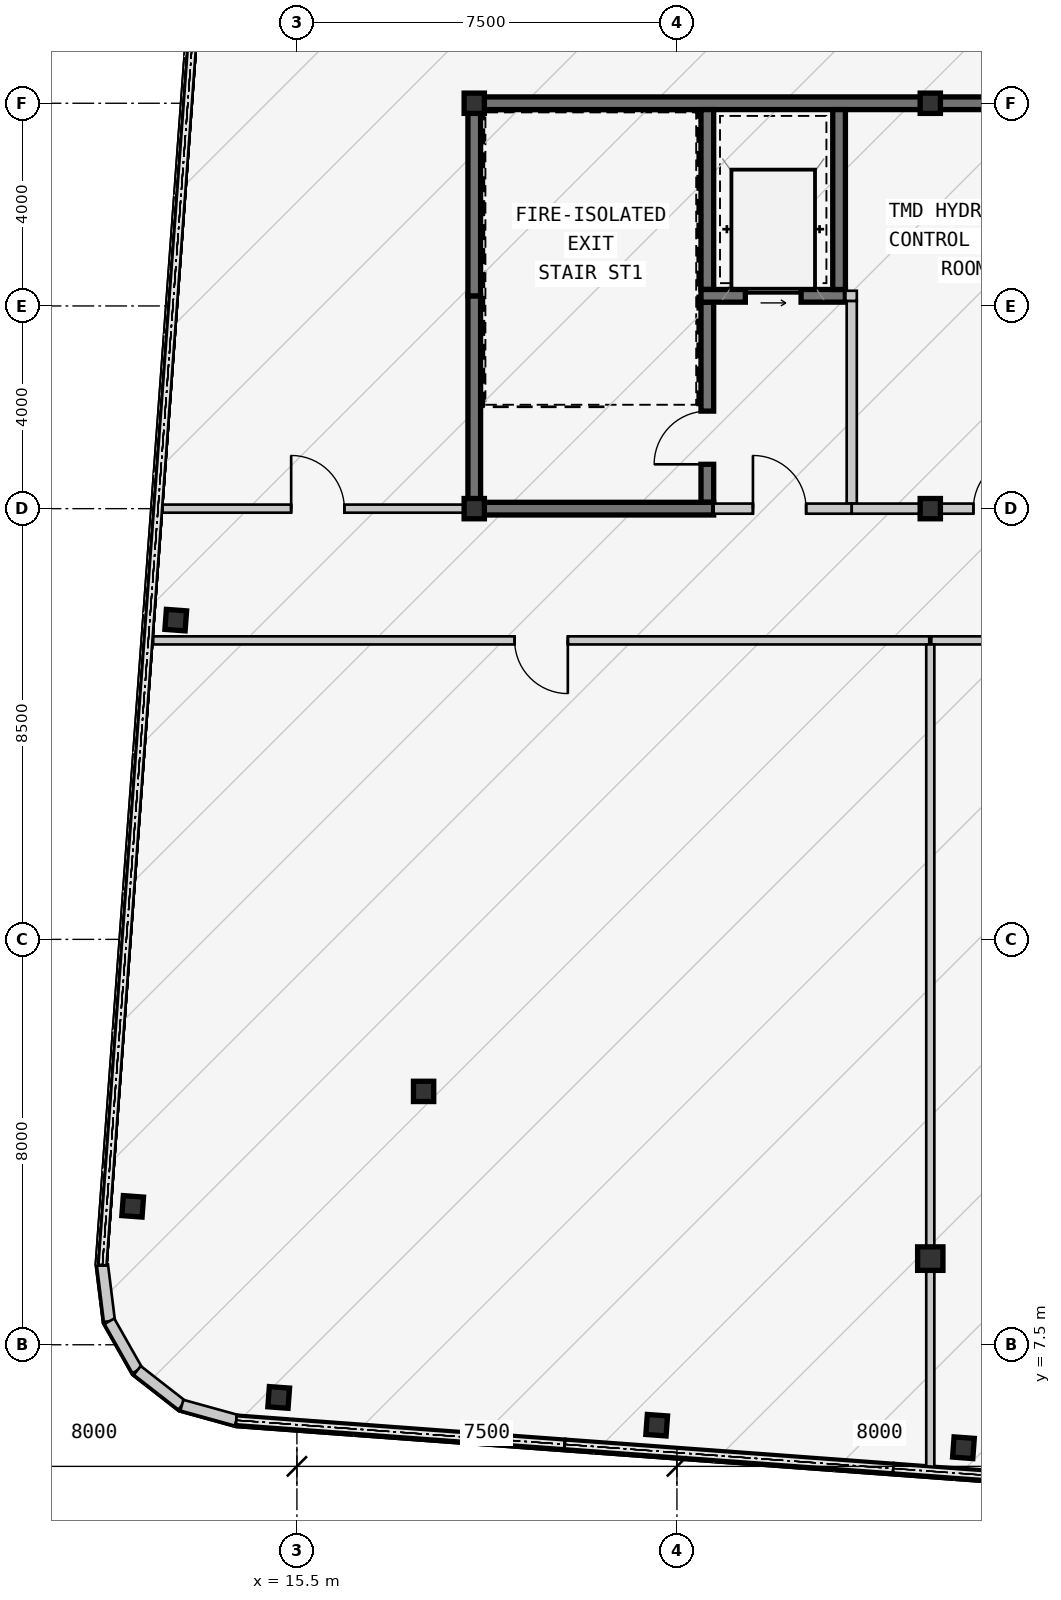
"""IFC4 building model, lengths in metres.
Left out: names, types, materials, properties, quantities, classifications, styles, units other than length and angle.
Written with IfcOpenShell. Run it as: python <this file> out.ifc"""

import sys

from ifc_helpers import new_model, si_unit, direction, frame, frame_2d, origin, origin_2d, place, context, subcontext, project, spatial, polyline, rectangle, hollow_rectangle, i_section, outline, extrude, source, transform, mapped, element, fill, save


model = new_model("IFC4")
c1 = context("Model", 3, precision=1e-05, world=origin(), true_north=direction((0.0, 1.0)))
c2 = subcontext(c1, "Body", "Model", "MODEL_VIEW")
j1 = project(units=[si_unit("LENGTHUNIT", "METRE"), si_unit("PLANEANGLEUNIT", "RADIAN")], contexts=[c1])
p1 = place(None, origin())
s1 = spatial("IfcSite", under=j1, at=p1, CompositionType="ELEMENT")
p2 = place(p1, origin())
s2 = spatial("IfcBuilding", under=s1, at=p2, CompositionType="ELEMENT")
p3 = place(p2, frame((0.0, 0.0, 253.05)))
s3 = spatial("IfcBuildingStorey", under=s2, at=p3, CompositionType="ELEMENT", Elevation=253.05)
m1 = source(origin(), c2, "Body", "SweptSolid", [
    extrude(hollow_rectangle(XDim=0.4, YDim=0.4, WallThickness=0.016, at=origin_2d()), origin(), (0.0, 0.0, 1.0), 15.375),
])
p4 = place(p3, frame((19.0, 24.0, 0.0), z_axis=(0.0, 0.0, 1.0), x_axis=(1.0, 0.0, 0.0)))
e1 = element("IfcColumn", 1, at=p4, inside=s3, PredefinedType="COLUMN", context=c2, shape_type="MappedRepresentation", body=[
    mapped(m1, transform((0.0, 0.0, 0.0), scale=1.0)),
])
m2 = source(origin(), c2, "Body", "SweptSolid", [
    extrude(hollow_rectangle(XDim=0.4, YDim=0.4, WallThickness=0.016, at=origin_2d()), origin(), (0.0, 0.0, 1.0), 12.802),
])
p5 = place(p3, frame((28.0, 24.0, 0.0), z_axis=(0.0, 0.0, 1.0), x_axis=(1.0, 0.0, 0.0)))
e2 = element("IfcColumn", 2, at=p5, inside=s3, PredefinedType="COLUMN", context=c2, shape_type="MappedRepresentation", body=[
    mapped(m2, transform((0.0, 0.0, 0.0), scale=1.0)),
])
m3 = source(origin(), c2, "Body", "SweptSolid", [
    extrude(hollow_rectangle(XDim=0.4, YDim=0.4, WallThickness=0.016, at=origin_2d()), origin(), (0.0, 0.0, 1.0), 15.543),
])
p6 = place(p3, frame((19.0, 32.0, 0.0), z_axis=(0.0, 0.0, 1.0), x_axis=(1.0, 0.0, 0.0)))
e3 = element("IfcColumn", 3, at=p6, inside=s3, PredefinedType="COLUMN", context=c2, shape_type="MappedRepresentation", body=[
    mapped(m3, transform((0.0, 0.0, 0.0), scale=1.0)),
])
m4 = source(origin(), c2, "Body", "SweptSolid", [
    extrude(hollow_rectangle(XDim=0.4, YDim=0.4, WallThickness=0.016, at=origin_2d()), origin(), (0.0, 0.0, 1.0), 12.97),
])
p7 = place(p3, frame((28.0, 32.0, 0.0), z_axis=(0.0, 0.0, 1.0), x_axis=(1.0, 0.0, 0.0)))
e4 = element("IfcColumn", 4, at=p7, inside=s3, PredefinedType="COLUMN", context=c2, shape_type="MappedRepresentation", body=[
    mapped(m4, transform((0.0, 0.0, 0.0), scale=1.0)),
])
m5 = source(origin(), c2, "Body", "SweptSolid", [
    extrude(i_section(OverallWidth=0.5, OverallDepth=0.464, WebThickness=0.022, FlangeThickness=0.034, at=origin_2d()), origin(), (0.0, 0.0, 1.0), 12.492),
])
p8 = place(p3, frame((28.0, 9.2, 0.0), z_axis=(0.0, 0.0, 1.0), x_axis=(1.0, 0.0, 0.0)))
e5 = element("IfcColumn", 5, at=p8, inside=s3, PredefinedType="COLUMN", context=c2, shape_type="MappedRepresentation", body=[
    mapped(m5, transform((0.0, 0.0, 0.0), scale=1.0)),
])
m6 = source(origin(), c2, "Body", "SweptSolid", [
    extrude(hollow_rectangle(XDim=0.4, YDim=0.4, WallThickness=0.016, at=origin_2d()), origin(), (0.0, 0.0, 1.0), 15.42),
])
p9 = place(p3, frame((18.0, 12.5, 0.0), z_axis=(0.0, 0.0, 1.0), x_axis=(1.0, 0.0, 0.0)))
e6 = element("IfcColumn", 6, at=p9, inside=s3, PredefinedType="COLUMN", context=c2, shape_type="MappedRepresentation", body=[
    mapped(m6, transform((0.0, 0.0, 0.0), scale=1.0)),
])
m7 = source(origin(), c2, "Body", "SweptSolid", [
    extrude(hollow_rectangle(XDim=0.4, YDim=0.4, WallThickness=0.016, at=origin_2d()), origin(), (0.0, 0.0, 1.0), 16.111),
])
p10 = place(p3, frame((15.141, 6.46, 0.0), z_axis=(0.0, 0.0, 1.0), x_axis=(0.997314477224, -0.073238197128, 0.0)))
e7 = element("IfcColumn", 7, at=p10, inside=s3, PredefinedType="COLUMN", context=c2, shape_type="MappedRepresentation", body=[
    mapped(m7, transform((0.0, 0.0, 0.0), scale=1.0)),
])
m8 = source(origin(), c2, "Body", "SweptSolid", [
    extrude(i_section(OverallWidth=0.4, OverallDepth=0.396, WebThickness=0.022, FlangeThickness=0.034, at=origin_2d()), origin(), (0.0, 0.0, 1.0), 13.966),
])
p11 = place(p3, frame((22.601, 5.912, 0.0), z_axis=(0.0, 0.0, 1.0), x_axis=(0.997314477224, -0.073238197128, 0.0)))
e8 = element("IfcColumn", 8, at=p11, inside=s3, PredefinedType="COLUMN", context=c2, shape_type="MappedRepresentation", body=[
    mapped(m8, transform((0.0, 0.0, 0.0), scale=1.0)),
])
m9 = source(origin(), c2, "Body", "SweptSolid", [
    extrude(i_section(OverallWidth=0.4, OverallDepth=0.396, WebThickness=0.022, FlangeThickness=0.034, at=origin_2d()), origin(), (0.0, 0.0, 1.0), 17.014),
])
for number, where, z_axis, x_axis in (
    (9, (12.259, 10.231, 0.0), (0.0, 0.0, 1.0), (0.997, -0.073, 0.0)),
    (10, (13.109, 21.8, 0.0), (0.0, 0.0, 1.0), (0.997, -0.073, 0.0)),
):
    element("IfcColumn", number, at=place(p3, frame(where, z_axis=z_axis, x_axis=x_axis)), inside=s3, PredefinedType="COLUMN", context=c2, shape_type="MappedRepresentation", body=[
        mapped(m9, transform((0.0, 0.0, 0.0), scale=1.0)),
    ])
m10 = source(origin(), c2, "Body", "SweptSolid", [
    extrude(hollow_rectangle(XDim=0.4, YDim=0.4, WallThickness=0.016, at=origin_2d()), origin(), (0.0, 0.0, 1.0), 12.226),
])
p12 = place(p3, frame((28.654, 5.468, 0.0), z_axis=(0.0, 0.0, 1.0), x_axis=(0.997314477224, -0.073238197128, 0.0)))
e11 = element("IfcColumn", 11, at=p12, inside=s3, PredefinedType="COLUMN", context=c2, shape_type="MappedRepresentation", body=[
    mapped(m10, transform((0.0, 0.0, 0.0), scale=1.0)),
])
p13 = place(p3, frame((11.663, 9.072, 0.0), z_axis=(0.0, 0.0, 1.0), x_axis=(0.122742076028, -0.992438604032, 0.0)))
e12 = element("IfcWall", 12, at=p13, inside=s3, PredefinedType="SOLIDWALL", context=c2, shape_type="SweptSolid", body=[
    extrude(outline(polyline([(0.0, 0.0), (1.116, 0.0), (1.116, 17.055), (0.0, 17.118), (0.0, 0.0)])), frame((0.0, 0.11, 0.0), z_axis=(0.0, -1.0, 0.0), x_axis=(1.0, 0.0, 0.0)), (0.0, 0.0, 1.0), 0.22),
])
p14 = place(p3, frame((11.8, 7.965, 0.0), z_axis=(0.0, 0.0, 1.0), x_axis=(0.493073284892, -0.869987779067, 0.0)))
e13 = element("IfcWall", 13, at=p14, inside=s3, PredefinedType="SOLIDWALL", context=c2, shape_type="SweptSolid", body=[
    extrude(outline(polyline([(0.0, 0.0), (1.116, 0.0), (1.116, 16.878), (0.0, 17.055), (0.0, 0.0)])), frame((0.0, 0.11, 0.0), z_axis=(0.0, -1.0, 0.0), x_axis=(1.0, 0.0, 0.0)), (0.0, 0.0, 1.0), 0.22),
])
p15 = place(p3, frame((12.35, 6.994, 0.0), z_axis=(0.0, 0.0, 1.0), x_axis=(0.788597772321, -0.614909386406, 0.0)))
e14 = element("IfcWall", 14, at=p15, inside=s3, PredefinedType="SOLIDWALL", context=c2, shape_type="SweptSolid", body=[
    extrude(outline(polyline([(0.0, 0.0), (1.116, 0.0), (1.116, 16.612), (0.0, 16.878), (0.0, 0.0)])), frame((0.0, 0.11, 0.0), z_axis=(0.0, -1.0, 0.0), x_axis=(1.0, 0.0, 0.0)), (0.0, 0.0, 1.0), 0.22),
])
p16 = place(p3, frame((13.23, 6.307, 0.0), z_axis=(0.0, 0.0, 1.0), x_axis=(0.963890028874, -0.266300605026, 0.0)))
e15 = element("IfcWall", 15, at=p16, inside=s3, PredefinedType="SOLIDWALL", context=c2, shape_type="SweptSolid", body=[
    extrude(outline(polyline([(0.0, 0.0), (1.116, 0.0), (1.116, 16.298), (0.0, 16.612), (0.0, 0.0)])), frame((0.0, 0.11, 0.0), z_axis=(0.0, -1.0, 0.0), x_axis=(1.0, 0.0, 0.0)), (0.0, 0.0, 1.0), 0.22),
])
p17 = place(p3, frame((14.305, 6.01, 14.241), z_axis=(0.0, 0.0, 1.0), x_axis=(0.997314286366, -0.073240796084, 0.0)))
e16 = element("IfcWall", 16, at=p17, inside=s3, PredefinedType="SOLIDWALL", context=c2, shape_type="SweptSolid", body=[
    extrude(outline(polyline([(0.0, 0.0), (6.5, 0.0), (6.5, 0.22), (0.0, 2.083), (0.0, 0.0)])), frame((0.0, 0.11, 0.0), z_axis=(0.0, -1.0, 0.0), x_axis=(1.0, 0.0, 0.0)), (0.0, 0.0, 1.0), 0.22),
])
p18 = place(p3, frame((20.788, 5.534, 12.378), z_axis=(0.0, 0.0, 1.0), x_axis=(0.997314084878, -0.073243539677, 0.0)))
e17 = element("IfcWall", 17, at=p18, inside=s3, PredefinedType="SOLIDWALL", context=c2, shape_type="SweptSolid", body=[
    extrude(outline(polyline([(0.0, 0.0), (6.5, 0.0), (6.5, 0.22), (0.0, 2.083), (0.0, 0.0)])), frame((0.0, 0.11, 0.0), z_axis=(0.0, -1.0, 0.0), x_axis=(1.0, 0.0, 0.0)), (0.0, 0.0, 1.0), 0.22),
])
p19 = place(p3, frame((27.271, 5.058, 10.515), z_axis=(0.0, 0.0, 1.0), x_axis=(0.997314286366, -0.073240796084, 0.0)))
e18 = element("IfcWall", 18, at=p19, inside=s3, PredefinedType="SOLIDWALL", context=c2, shape_type="SweptSolid", body=[
    extrude(outline(polyline([(0.0, 0.0), (6.5, 0.0), (6.5, 0.22), (0.0, 2.083), (0.0, 0.0)])), frame((0.0, 0.11, 0.0), z_axis=(0.0, -1.0, 0.0), x_axis=(1.0, 0.0, 0.0)), (0.0, 0.0, 1.0), 0.22),
])
m11 = source(origin(), c2, "Body", "SweptSolid", [
    extrude(rectangle(XDim=9.125, YDim=0.25, at=frame_2d((4.562, 0.0))), origin(), (0.0, 0.0, 1.0), 4.3),
])
p20 = place(p3, frame((18.875, 32.0, 0.0), z_axis=(0.0, 0.0, 1.0), x_axis=(1.0, 0.0, 0.0)))
e19 = element("IfcWall", 19, at=p20, inside=s3, PredefinedType="SHEAR", context=c2, shape_type="MappedRepresentation", body=[
    mapped(m11, transform((0.0, 0.0, 0.0), scale=1.0)),
])
m12 = source(origin(), c2, "Body", "SweptSolid", [
    extrude(rectangle(XDim=11.2, YDim=0.25, at=frame_2d((5.6, 0.0))), origin(), (0.0, 0.0, 1.0), 4.3),
])
p21 = place(p3, frame((28.0, 32.0, 0.0), z_axis=(0.0, 0.0, 1.0), x_axis=(1.0, 0.0, 0.0)))
e20 = element("IfcWall", 20, at=p21, inside=s3, PredefinedType="SHEAR", context=c2, shape_type="MappedRepresentation", body=[
    mapped(m12, transform((0.0, 0.0, 0.0), scale=1.0)),
])
m13 = source(origin(), c2, "Body", "SweptSolid", [
    extrude(rectangle(XDim=4.075, YDim=0.25, at=frame_2d((2.038, 0.0))), origin(), (0.0, 0.0, 1.0), 4.3),
])
p22 = place(p3, frame((19.0, 24.125, 0.0), z_axis=(0.0, 0.0, 1.0), x_axis=(0.0, 1.0, 0.0)))
e21 = element("IfcWall", 21, at=p22, inside=s3, PredefinedType="SHEAR", context=c2, shape_type="MappedRepresentation", body=[
    mapped(m13, transform((0.0, 0.0, 0.0), scale=1.0)),
])
m14 = source(origin(), c2, "Body", "SweptSolid", [
    extrude(rectangle(XDim=3.675, YDim=0.25, at=frame_2d((1.837, 0.0))), origin(), (0.0, 0.0, 1.0), 4.3),
])
p23 = place(p3, frame((19.0, 28.2, 0.0), z_axis=(0.0, 0.0, 1.0), x_axis=(0.0, 1.0, 0.0)))
e22 = element("IfcWall", 22, at=p23, inside=s3, PredefinedType="SHEAR", context=c2, shape_type="MappedRepresentation", body=[
    mapped(m14, transform((0.0, 0.0, 0.0), scale=1.0)),
])
m15 = source(origin(), c2, "Body", "SweptSolid", [
    extrude(rectangle(XDim=3.55, YDim=0.25, at=frame_2d((1.775, 0.0))), origin(), (0.0, 0.0, 1.0), 4.3),
])
p24 = place(p3, frame((23.6, 28.325, 0.0), z_axis=(0.0, 0.0, 1.0), x_axis=(0.0, 1.0, 0.0)))
e23 = element("IfcWall", 23, at=p24, inside=s3, PredefinedType="SHEAR", context=c2, shape_type="MappedRepresentation", body=[
    mapped(m15, transform((0.0, 0.0, 0.0), scale=1.0)),
])
m16 = source(origin(), c2, "Body", "SweptSolid", [
    extrude(rectangle(XDim=3.95, YDim=0.25, at=frame_2d((1.975, 0.0))), origin(), (0.0, 0.0, 1.0), 4.3),
])
p25 = place(p3, frame((23.6, 24.125, 0.0), z_axis=(0.0, 0.0, 1.0), x_axis=(0.0, 1.0, 0.0)))
e24 = element("IfcWall", 24, at=p25, inside=s3, PredefinedType="SHEAR", context=c2, shape_type="MappedRepresentation", body=[
    mapped(m16, transform((0.0, 0.0, 0.0), scale=1.0)),
])
m17 = source(origin(), c2, "Body", "SweptSolid", [
    extrude(rectangle(XDim=1.05, YDim=2.1, at=frame_2d((0.525, 1.05))), frame((0.0, 0.135, 0.0), z_axis=(0.0, -1.0, 0.0), x_axis=(1.0, 0.0, 0.0)), (0.0, 0.0, 1.0), 0.27),
])
p26 = place(p25, frame((0.75, 0.0, 0.0)))
e25 = element("IfcOpeningElement", 25, at=p26, cuts=e24, PredefinedType="OPENING", context=c2, shape_type="MappedRepresentation", body=[
    mapped(m17, transform((0.0, 0.0, 0.0), scale=1.0)),
])
m18 = source(origin(), c2, "Body", "SweptSolid", [
    extrude(rectangle(XDim=4.85, YDim=0.25, at=frame_2d((2.425, 0.0))), origin(), (0.0, 0.0, 1.0), 4.3),
])
p27 = place(p3, frame((18.875, 24.0, 0.0), z_axis=(0.0, 0.0, 1.0), x_axis=(1.0, 0.0, 0.0)))
e26 = element("IfcWall", 26, at=p27, inside=s3, PredefinedType="SHEAR", context=c2, shape_type="MappedRepresentation", body=[
    mapped(m18, transform((0.0, 0.0, 0.0), scale=1.0)),
])
m19 = source(origin(), c2, "Body", "SweptSolid", [
    extrude(rectangle(XDim=2.85, YDim=0.25, at=frame_2d((1.425, 0.0))), origin(), (0.0, 0.0, 1.0), 4.3),
])
p28 = place(p3, frame((23.475, 28.2, 0.0), z_axis=(0.0, 0.0, 1.0), x_axis=(1.0, 0.0, 0.0)))
e27 = element("IfcWall", 27, at=p28, inside=s3, PredefinedType="SHEAR", context=c2, shape_type="MappedRepresentation", body=[
    mapped(m19, transform((0.0, 0.0, 0.0), scale=1.0)),
])
m20 = source(origin(), c2, "Body", "SweptSolid", [
    extrude(rectangle(XDim=1.1, YDim=2.15, at=frame_2d((0.55, 1.075))), frame((0.0, 0.135, 0.0), z_axis=(0.0, -1.0, 0.0), x_axis=(1.0, 0.0, 0.0)), (0.0, 0.0, 1.0), 0.27),
])
p29 = place(p28, frame((0.875, 0.0, 0.0)))
e28 = element("IfcOpeningElement", 28, at=p29, cuts=e27, PredefinedType="OPENING", context=c2, shape_type="MappedRepresentation", body=[
    mapped(m20, transform((0.0, 0.0, 0.0), scale=1.0)),
])
p30 = place(p3, frame((26.2, 28.325, 0.0), z_axis=(0.0, 0.0, 1.0), x_axis=(0.0, 1.0, 0.0)))
e29 = element("IfcWall", 29, at=p30, inside=s3, PredefinedType="SHEAR", context=c2, shape_type="MappedRepresentation", body=[
    mapped(m15, transform((0.0, 0.0, 0.0), scale=1.0)),
])
m21 = source(origin(), c2, "Body", "SweptSolid", [
    extrude(rectangle(XDim=4.0, YDim=0.2, at=frame_2d((2.0, 0.0))), origin(), (0.0, 0.0, 1.0), 4.3),
])
p31 = place(p3, frame((26.45, 24.1, 0.0), z_axis=(0.0, 0.0, 1.0), x_axis=(0.0, 1.0, 0.0)))
e30 = element("IfcWall", 30, at=p31, inside=s3, PredefinedType="SOLIDWALL", context=c2, shape_type="MappedRepresentation", body=[
    mapped(m21, transform((0.0, 0.0, 0.0), scale=1.0)),
])
m22 = source(origin(), c2, "Body", "SweptSolid", [
    extrude(rectangle(XDim=2.725, YDim=0.2, at=frame_2d((1.362, 0.0))), origin(), (0.0, 0.0, 1.0), 4.3),
])
p32 = place(p3, frame((23.725, 24.0, 0.0), z_axis=(0.0, 0.0, 1.0), x_axis=(1.0, 0.0, 0.0)))
e31 = element("IfcWall", 31, at=p32, inside=s3, PredefinedType="SOLIDWALL", context=c2, shape_type="MappedRepresentation", body=[
    mapped(m22, transform((0.0, 0.0, 0.0), scale=1.0)),
])
m23 = source(origin(), c2, "Body", "SweptSolid", [
    extrude(rectangle(XDim=1.05, YDim=2.1, at=frame_2d((0.525, 1.05))), frame((0.0, 0.11, 0.0), z_axis=(0.0, -1.0, 0.0), x_axis=(1.0, 0.0, 0.0)), (0.0, 0.0, 1.0), 0.22),
])
p33 = place(p32, frame((0.775, 0.0, 0.0)))
e32 = element("IfcOpeningElement", 32, at=p33, cuts=e31, PredefinedType="OPENING", context=c2, shape_type="MappedRepresentation", body=[
    mapped(m23, transform((0.0, 0.0, 0.0), scale=1.0)),
])
m24 = source(origin(), c2, "Body", "SweptSolid", [
    extrude(rectangle(XDim=4.75, YDim=0.2, at=frame_2d((2.375, 0.0))), origin(), (0.0, 0.0, 1.0), 4.3),
])
p34 = place(p3, frame((31.2, 24.0, 0.0), z_axis=(0.0, 0.0, 1.0), x_axis=(-1.0, 0.0, 0.0)))
e33 = element("IfcWall", 33, at=p34, inside=s3, PredefinedType="SOLIDWALL", context=c2, shape_type="MappedRepresentation", body=[
    mapped(m24, transform((0.0, 0.0, 0.0), scale=1.0)),
])
p35 = place(p34, frame((1.3, 0.0, 0.0)))
e34 = element("IfcOpeningElement", 34, at=p35, cuts=e33, PredefinedType="OPENING", context=c2, shape_type="MappedRepresentation", body=[
    mapped(m23, transform((0.0, 0.0, 0.0), scale=1.0)),
])
m25 = source(origin(), c2, "Body", "SweptSolid", [
    extrude(rectangle(XDim=13.959, YDim=0.16, at=frame_2d((6.98, 0.0))), origin(), (0.0, 0.0, 1.0), 4.3),
])
p36 = place(p3, frame((41.98, 21.4, 0.0), z_axis=(0.0, 0.0, 1.0), x_axis=(-1.0, 0.0, 0.0)))
e35 = element("IfcWall", 35, at=p36, inside=s3, PredefinedType="PARTITIONING", context=c2, shape_type="MappedRepresentation", body=[
    mapped(m25, transform((0.0, 0.0, 0.0), scale=1.0)),
])
m26 = source(origin(), c2, "Body", "SweptSolid", [
    extrude(rectangle(XDim=1.05, YDim=2.1, at=frame_2d((0.525, 1.05))), frame((0.0, 0.09, 0.0), z_axis=(0.0, -1.0, 0.0), x_axis=(1.0, 0.0, 0.0)), (0.0, 0.0, 1.0), 0.18),
])
p37 = place(p36, frame((6.455, 0.0, 0.0)))
e36 = element("IfcOpeningElement", 36, at=p37, cuts=e35, PredefinedType="OPENING", context=c2, shape_type="MappedRepresentation", body=[
    mapped(m26, transform((0.0, 0.0, 0.0), scale=1.0)),
])
m27 = source(origin(), c2, "Body", "SweptSolid", [
    extrude(rectangle(XDim=15.316, YDim=0.16, at=frame_2d((7.658, 0.0))), origin(), (0.0, 0.0, 1.0), 4.3),
])
p38 = place(p3, frame((27.98, 21.4, 0.0), z_axis=(0.0, 0.0, 1.0), x_axis=(-1.0, 0.0, 0.0)))
e37 = element("IfcWall", 37, at=p38, inside=s3, PredefinedType="PARTITIONING", context=c2, shape_type="MappedRepresentation", body=[
    mapped(m27, transform((0.0, 0.0, 0.0), scale=1.0)),
])
p39 = place(p38, frame((7.133, 0.0, 0.0)))
e38 = element("IfcOpeningElement", 38, at=p39, cuts=e37, PredefinedType="OPENING", context=c2, shape_type="MappedRepresentation", body=[
    mapped(m26, transform((0.0, 0.0, 0.0), scale=1.0)),
])
m28 = source(origin(), c2, "Body", "SweptSolid", [
    extrude(rectangle(XDim=6.032, YDim=0.16, at=frame_2d((3.016, 0.0))), origin(), (0.0, 0.0, 1.0), 4.3),
])
p40 = place(p3, frame((12.843, 24.0, 0.0), z_axis=(0.0, 0.0, 1.0), x_axis=(1.0, 0.0, 0.0)))
e39 = element("IfcWall", 39, at=p40, inside=s3, PredefinedType="PARTITIONING", context=c2, shape_type="MappedRepresentation", body=[
    mapped(m28, transform((0.0, 0.0, 0.0), scale=1.0)),
])
p41 = place(p40, frame((2.543, 0.0, 0.0)))
e40 = element("IfcOpeningElement", 40, at=p41, cuts=e39, PredefinedType="OPENING", context=c2, shape_type="MappedRepresentation", body=[
    mapped(m26, transform((0.0, 0.0, 0.0), scale=1.0)),
])
m29 = source(origin(), c2, "Body", "SweptSolid", [
    extrude(rectangle(XDim=16.231, YDim=0.16, at=frame_2d((8.116, 0.0))), origin(), (0.0, 0.0, 1.0), 4.3),
])
p42 = place(p3, frame((28.0, 5.089, 0.0), z_axis=(0.0, 0.0, 1.0), x_axis=(0.0, 1.0, 0.0)))
e41 = element("IfcWall", 41, at=p42, inside=s3, PredefinedType="PARTITIONING", context=c2, shape_type="MappedRepresentation", body=[
    mapped(m29, transform((0.0, 0.0, 0.0), scale=1.0)),
])
m30 = source(origin(), c2, "Body", "SweptSolid", [
    extrude(rectangle(XDim=0.225, YDim=0.2, at=frame_2d((0.113, 0.0))), origin(), (0.0, 0.0, 1.0), 4.3),
])
p43 = place(p3, frame((26.325, 28.2, 0.0), z_axis=(0.0, 0.0, 1.0), x_axis=(1.0, 0.0, 0.0)))
e42 = element("IfcWall", 42, at=p43, inside=s3, PredefinedType="SOLIDWALL", context=c2, shape_type="MappedRepresentation", body=[
    mapped(m30, transform((0.0, 0.0, 0.0), scale=1.0)),
])
m31 = source(origin(), c2, "Body", "SweptSolid", [
    extrude(rectangle(XDim=1.05, YDim=2.1, at=frame_2d((0.525, 1.05))), frame((0.0, 0.025, 0.0), z_axis=(0.0, -1.0, 0.0), x_axis=(1.0, 0.0, 0.0)), (0.0, 0.0, 1.0), 0.05),
])
p44 = place(p26, origin())
e43 = element("IfcDoor", 43, at=p44, inside=s3, OperationType="SINGLE_SWING_LEFT", PredefinedType="DOOR", context=c2, shape_type="MappedRepresentation", body=[
    mapped(m31, transform((0.0, 0.0, 0.0), scale=1.0)),
])
fill(e25, e43)
m32 = source(origin(), c2, "Body", "SweptSolid", [
    extrude(rectangle(XDim=1.1, YDim=2.15, at=frame_2d((0.55, 1.075))), frame((0.0, 0.025, 0.0), z_axis=(0.0, -1.0, 0.0), x_axis=(1.0, 0.0, 0.0)), (0.0, 0.0, 1.0), 0.05),
])
p45 = place(p29, origin())
e44 = element("IfcDoor", 44, at=p45, inside=s3, OperationType="SLIDING_TO_LEFT", PredefinedType="DOOR", context=c2, shape_type="MappedRepresentation", body=[
    mapped(m32, transform((0.0, 0.0, 0.0), scale=1.0)),
])
fill(e28, e44)
p46 = place(p33, origin())
e45 = element("IfcDoor", 45, at=p46, inside=s3, OperationType="SINGLE_SWING_LEFT", PredefinedType="DOOR", context=c2, shape_type="MappedRepresentation", body=[
    mapped(m31, transform((0.0, 0.0, 0.0), scale=1.0)),
])
fill(e32, e45)
p47 = place(p35, frame((1.05, 0.0, 0.0), z_axis=(0.0, 0.0, 1.0), x_axis=(-1.0, 0.0, 0.0)))
e46 = element("IfcDoor", 46, at=p47, inside=s3, OperationType="SINGLE_SWING_RIGHT", PredefinedType="DOOR", context=c2, shape_type="MappedRepresentation", body=[
    mapped(m31, transform((0.0, 0.0, 0.0), scale=1.0)),
])
fill(e34, e46)
p48 = place(p39, origin())
e47 = element("IfcDoor", 47, at=p48, inside=s3, OperationType="SINGLE_SWING_LEFT", PredefinedType="DOOR", context=c2, shape_type="MappedRepresentation", body=[
    mapped(m31, transform((0.0, 0.0, 0.0), scale=1.0)),
])
fill(e38, e47)
p49 = place(p41, origin())
e48 = element("IfcDoor", 48, at=p49, inside=s3, OperationType="SINGLE_SWING_LEFT", PredefinedType="DOOR", context=c2, shape_type="MappedRepresentation", body=[
    mapped(m31, transform((0.0, 0.0, 0.0), scale=1.0)),
])
fill(e40, e48)
save(model, sys.argv[1])
